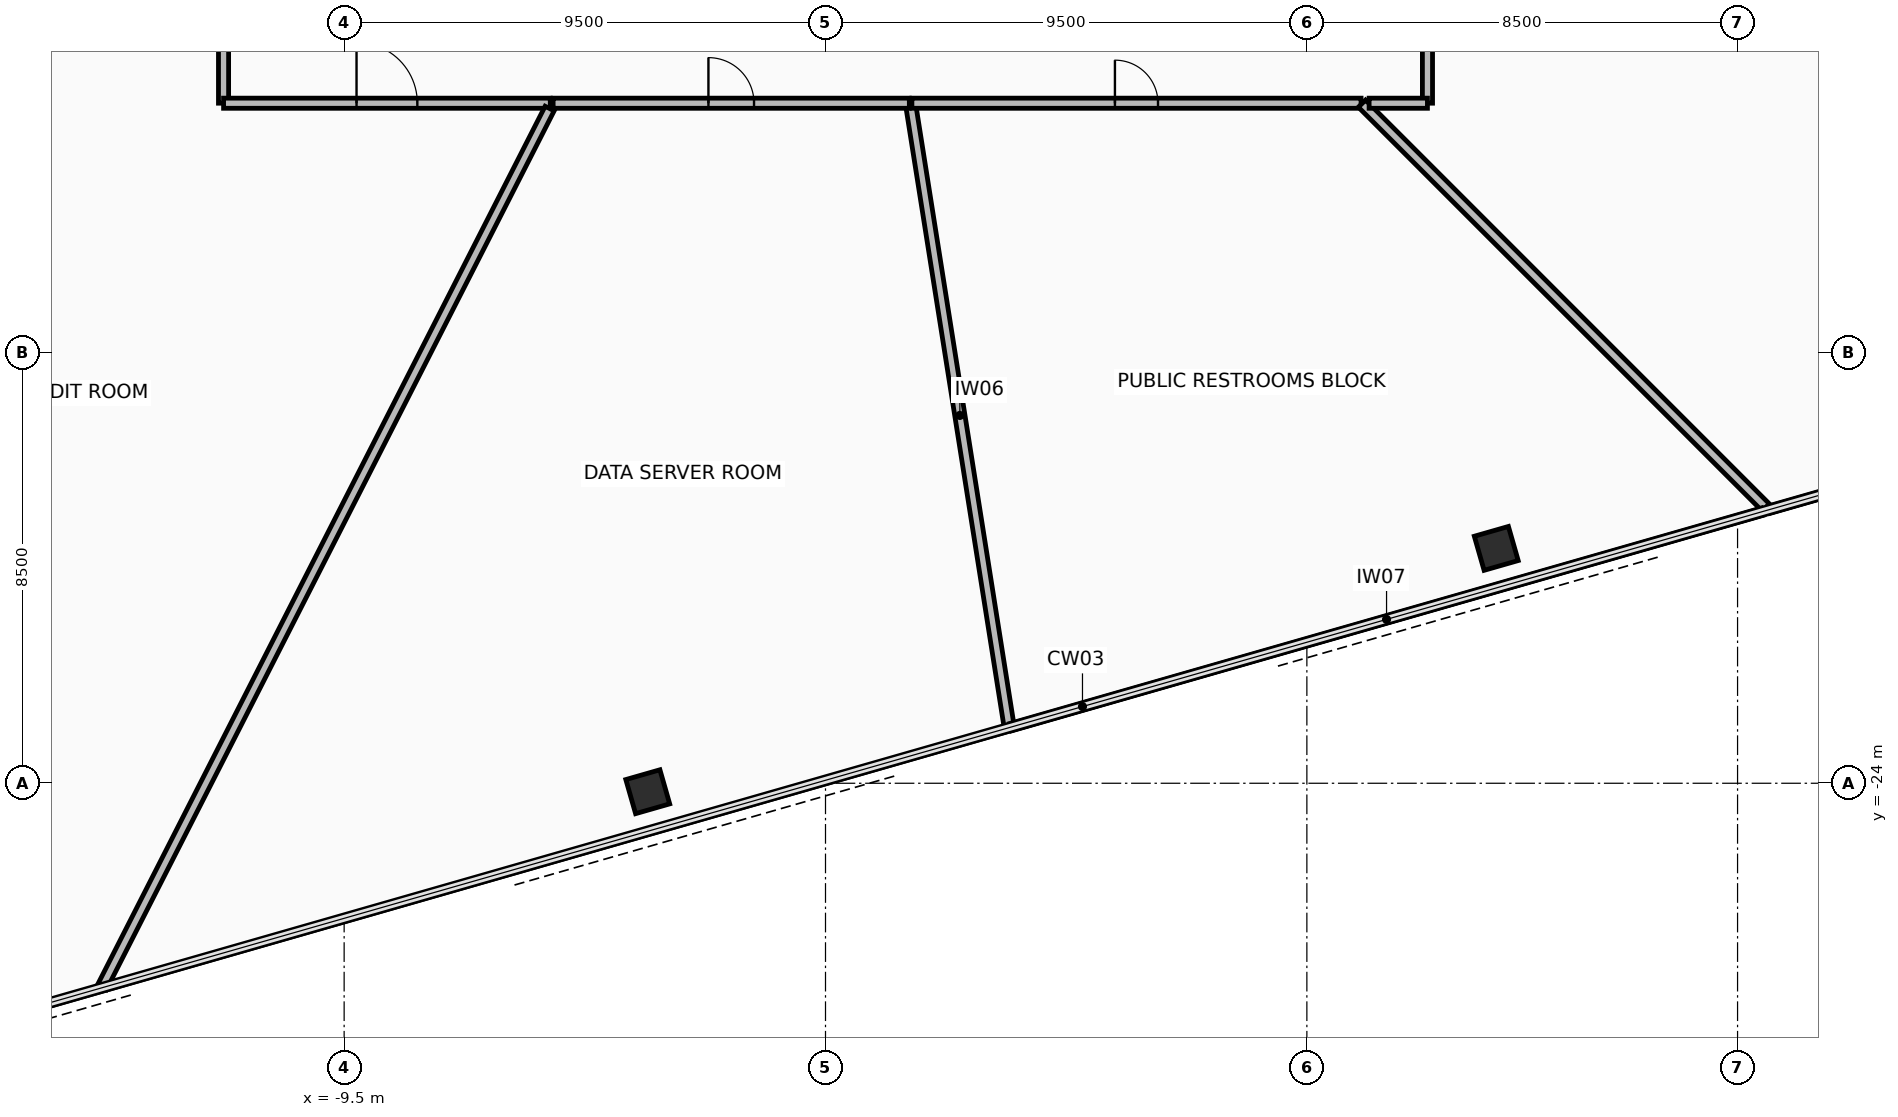
"""IFC4 building model, lengths in metres.
Left out: names, types, materials, properties, quantities, classifications, styles, units other than length and angle.
Written with IfcOpenShell. Run it as: python <this file> out.ifc"""

import sys

from ifc_helpers import new_model, si_unit, direction, frame, frame_2d, origin, origin_2d, place, context, subcontext, project, spatial, rectangle, hollow_rectangle, extrude, element, fill, save


model = new_model("IFC4")
c1 = context("Model", 3, precision=1e-05, world=origin(), true_north=direction((0.0, 1.0)))
c2 = subcontext(c1, "Body", "Model", "MODEL_VIEW")
j1 = project(units=[si_unit("LENGTHUNIT", "METRE"), si_unit("PLANEANGLEUNIT", "RADIAN")], contexts=[c1])
p1 = place(None, origin())
s1 = spatial("IfcSite", under=j1, at=p1, CompositionType="ELEMENT")
p2 = place(p1, origin())
s2 = spatial("IfcBuilding", under=s1, at=p2, CompositionType="ELEMENT")
p3 = place(p2, frame((0.0, 0.0, 107.7)))
s3 = spatial("IfcBuildingStorey", under=s2, at=p3, CompositionType="ELEMENT", Elevation=107.7)
for number, where, z_axis, x_axis in (
    (1, (-3.508, -24.167, 0.0), (0.0, 0.0, 1.0), (0.961, 0.276, 0.0)),
    (2, (13.238, -19.365, 0.0), (0.0, 0.0, 1.0), (0.961, 0.276, 0.0)),
):
    element("IfcColumn", number, at=place(p3, frame(where, z_axis=z_axis, x_axis=x_axis)), inside=s3, PredefinedType="COLUMN", context=c2, shape_type="SweptSolid", body=[
        extrude(hollow_rectangle(XDim=0.7, YDim=0.7, WallThickness=0.04, at=origin_2d()), origin(), (0.0, 0.0, 1.0), 4.75),
    ])
p4 = place(p3, frame((3.623, -22.873, 0.0), z_axis=(0.0, 0.0, 1.0), x_axis=(-0.156425980471, 0.987689684382, 0.0)))
e3 = element("IfcWall", 3, at=p4, inside=s3, PredefinedType="PARTITIONING", context=c2, shape_type="SweptSolid", body=[
    extrude(rectangle(XDim=12.417, YDim=0.2, at=frame_2d((6.208, 0.0))), origin(), (0.0, 0.0, 1.0), 2.255),
])
p5 = place(p3, frame((1.705, -10.58, 0.0), z_axis=(0.0, 0.0, 1.0), x_axis=(1.0, 0.0, 0.0)))
e4 = element("IfcWall", 4, at=p5, inside=s3, PredefinedType="PARTITIONING", context=c2, shape_type="SweptSolid", body=[
    extrude(rectangle(XDim=8.865, YDim=0.2, at=frame_2d((4.432, 0.0))), origin(), (0.0, 0.0, 1.0), 2.755),
])
p6 = place(p5, frame((4.007, 0.0, 0.0)))
e5 = element("IfcOpeningElement", 5, at=p6, cuts=e4, PredefinedType="OPENING", context=c2, shape_type="SweptSolid", body=[
    extrude(rectangle(XDim=0.85, YDim=2.1, at=frame_2d((0.425, 1.05))), frame((0.0, 0.11, 0.0), z_axis=(0.0, -1.0, 0.0), x_axis=(1.0, 0.0, 0.0)), (0.0, 0.0, 1.0), 0.22),
])
p7 = place(p3, frame((10.587, -10.587, 0.0), z_axis=(0.0, 0.0, 1.0), x_axis=(0.707106781187, -0.707106781187, 0.0)))
e6 = element("IfcWall", 6, at=p7, inside=s3, PredefinedType="PARTITIONING", context=c2, shape_type="SweptSolid", body=[
    extrude(rectangle(XDim=11.34, YDim=0.2, at=frame_2d((5.67, 0.0))), origin(), (0.0, 0.0, 1.0), 2.255),
])
p8 = place(p3, frame((18.491, -18.639, 0.0), z_axis=(0.0, 0.0, 1.0), x_axis=(-0.961263863121, -0.275629797842, 0.0)))
e7 = element("IfcWall", 7, at=p8, inside=s3, PredefinedType="PARTITIONING", context=c2, shape_type="SweptSolid", body=[
    extrude(rectangle(XDim=15.434, YDim=0.15, at=frame_2d((7.717, 0.0))), origin(), (0.0, 0.0, 1.0), 4.56),
])
p9 = place(p3, frame((11.88, -10.579, 0.0), z_axis=(0.0, 0.0, 1.0), x_axis=(0.0, 1.0, 0.0)))
e8 = element("IfcWall", 8, at=p9, inside=s3, PredefinedType="PARTITIONING", context=c2, shape_type="SweptSolid", body=[
    extrude(rectangle(XDim=8.668, YDim=0.2, at=frame_2d((4.334, 0.0))), origin(), (0.0, 0.0, 1.0), 2.355),
])
p10 = place(p9, frame((3.909, 0.0, 0.0)))
e9 = element("IfcOpeningElement", 9, at=p10, cuts=e8, PredefinedType="OPENING", context=c2, shape_type="SweptSolid", body=[
    extrude(rectangle(XDim=0.85, YDim=2.1, at=frame_2d((0.425, 1.05))), frame((0.0, 0.11, 0.0), z_axis=(0.0, -1.0, 0.0), x_axis=(1.0, 0.0, 0.0)), (0.0, 0.0, 1.0), 0.22),
])
p11 = place(p3, frame((31.267, -14.976, 0.0), z_axis=(0.0, 0.0, 1.0), x_axis=(-0.961262306809, -0.275635225449, 0.0)))
e10 = element("IfcWall", 10, at=p11, inside=s3, PredefinedType="PARTITIONING", context=c2, shape_type="SweptSolid", body=[
    extrude(rectangle(XDim=13.156, YDim=0.15, at=frame_2d((6.578, 0.0))), origin(), (0.0, 0.0, 1.0), 4.56),
])
p12 = place(p3, frame((10.729, -10.58, 0.0), z_axis=(0.0, 0.0, 1.0), x_axis=(1.0, 0.0, 0.0)))
e11 = element("IfcWall", 11, at=p12, inside=s3, PredefinedType="PARTITIONING", context=c2, shape_type="SweptSolid", body=[
    extrude(rectangle(XDim=1.151, YDim=0.2, at=frame_2d((0.575, 0.0))), origin(), (0.0, 0.0, 1.0), 2.755),
])
p13 = place(p3, frame((-11.894, -6.06, 0.0), z_axis=(0.0, 0.0, 1.0), x_axis=(-0.891001418235, -0.454000520598, 0.0)))
e12 = element("IfcWall", 12, at=p13, inside=s3, PredefinedType="PARTITIONING", context=c2, shape_type="SweptSolid", body=[
    extrude(rectangle(XDim=9.493, YDim=0.2, at=frame_2d((4.747, 0.0))), origin(), (0.0, 0.0, 1.0), 2.255),
])
p14 = place(p3, frame((-11.88, -6.171, 0.0), z_axis=(0.0, 0.0, 1.0), x_axis=(0.0, -1.0, 0.0)))
e13 = element("IfcWall", 13, at=p14, inside=s3, PredefinedType="PARTITIONING", context=c2, shape_type="SweptSolid", body=[
    extrude(rectangle(XDim=4.408, YDim=0.2, at=frame_2d((2.204, 0.0))), origin(), (0.0, 0.0, 1.0), 2.755),
])
p15 = place(p3, frame((-11.879, -10.58, 0.0), z_axis=(0.0, 0.0, 1.0), x_axis=(1.0, 0.0, 0.0)))
e14 = element("IfcWall", 14, at=p15, inside=s3, PredefinedType="PARTITIONING", context=c2, shape_type="SweptSolid", body=[
    extrude(rectangle(XDim=6.448, YDim=0.2, at=frame_2d((3.224, 0.0))), origin(), (0.0, 0.0, 1.0), 2.355),
])
p16 = place(p15, frame((2.624, 0.0, 0.0)))
e15 = element("IfcOpeningElement", 15, at=p16, cuts=e14, PredefinedType="OPENING", context=c2, shape_type="SweptSolid", body=[
    extrude(rectangle(XDim=1.2, YDim=2.15, at=frame_2d((0.6, 1.075))), frame((0.0, 0.11, 0.0), z_axis=(0.0, -1.0, 0.0), x_axis=(1.0, 0.0, 0.0)), (0.0, 0.0, 1.0), 0.22),
])
p17 = place(p3, frame((-5.444, -10.685, 0.0), z_axis=(0.0, 0.0, 1.0), x_axis=(-0.453983839292, -0.891009917824, 0.0)))
e16 = element("IfcWall", 16, at=p17, inside=s3, PredefinedType="PARTITIONING", context=c2, shape_type="SweptSolid", body=[
    extrude(rectangle(XDim=19.465, YDim=0.2, at=frame_2d((9.732, 0.0))), origin(), (0.0, 0.0, 1.0), 2.255),
])
p18 = place(p3, frame((-5.375, -10.58, 0.0), z_axis=(0.0, 0.0, 1.0), x_axis=(1.0, 0.0, 0.0)))
e17 = element("IfcWall", 17, at=p18, inside=s3, PredefinedType="PARTITIONING", context=c2, shape_type="SweptSolid", body=[
    extrude(rectangle(XDim=7.03, YDim=0.2, at=frame_2d((3.515, 0.0))), origin(), (0.0, 0.0, 1.0), 2.355),
])
p19 = place(p18, frame((3.065, 0.0, 0.0)))
e18 = element("IfcOpeningElement", 18, at=p19, cuts=e17, PredefinedType="OPENING", context=c2, shape_type="SweptSolid", body=[
    extrude(rectangle(XDim=0.9, YDim=2.1, at=frame_2d((0.45, 1.05))), frame((0.0, 0.11, 0.0), z_axis=(0.0, -1.0, 0.0), x_axis=(1.0, 0.0, 0.0)), (0.0, 0.0, 1.0), 0.22),
])
p20 = place(p6, origin())
e19 = element("IfcDoor", 19, at=p20, inside=s3, OperationType="SINGLE_SWING_RIGHT", PredefinedType="DOOR", context=c2, shape_type="SweptSolid", body=[
    extrude(rectangle(XDim=0.85, YDim=2.1, at=frame_2d((0.425, 1.05))), frame((0.0, 0.025, 0.0), z_axis=(0.0, -1.0, 0.0), x_axis=(1.0, 0.0, 0.0)), (0.0, 0.0, 1.0), 0.05),
])
fill(e5, e19)
p21 = place(p16, origin())
e20 = element("IfcDoor", 20, at=p21, inside=s3, OperationType="SINGLE_SWING_LEFT", PredefinedType="DOOR", context=c2, shape_type="SweptSolid", body=[
    extrude(rectangle(XDim=1.2, YDim=2.15, at=frame_2d((0.6, 1.075))), frame((0.0, 0.025, 0.0), z_axis=(0.0, -1.0, 0.0), x_axis=(1.0, 0.0, 0.0)), (0.0, 0.0, 1.0), 0.05),
])
fill(e15, e20)
p22 = place(p19, origin())
e21 = element("IfcDoor", 21, at=p22, inside=s3, OperationType="SINGLE_SWING_LEFT", PredefinedType="DOOR", context=c2, shape_type="SweptSolid", body=[
    extrude(rectangle(XDim=0.9, YDim=2.1, at=frame_2d((0.45, 1.05))), frame((0.0, 0.025, 0.0), z_axis=(0.0, -1.0, 0.0), x_axis=(1.0, 0.0, 0.0)), (0.0, 0.0, 1.0), 0.05),
])
fill(e18, e21)
save(model, sys.argv[1])
